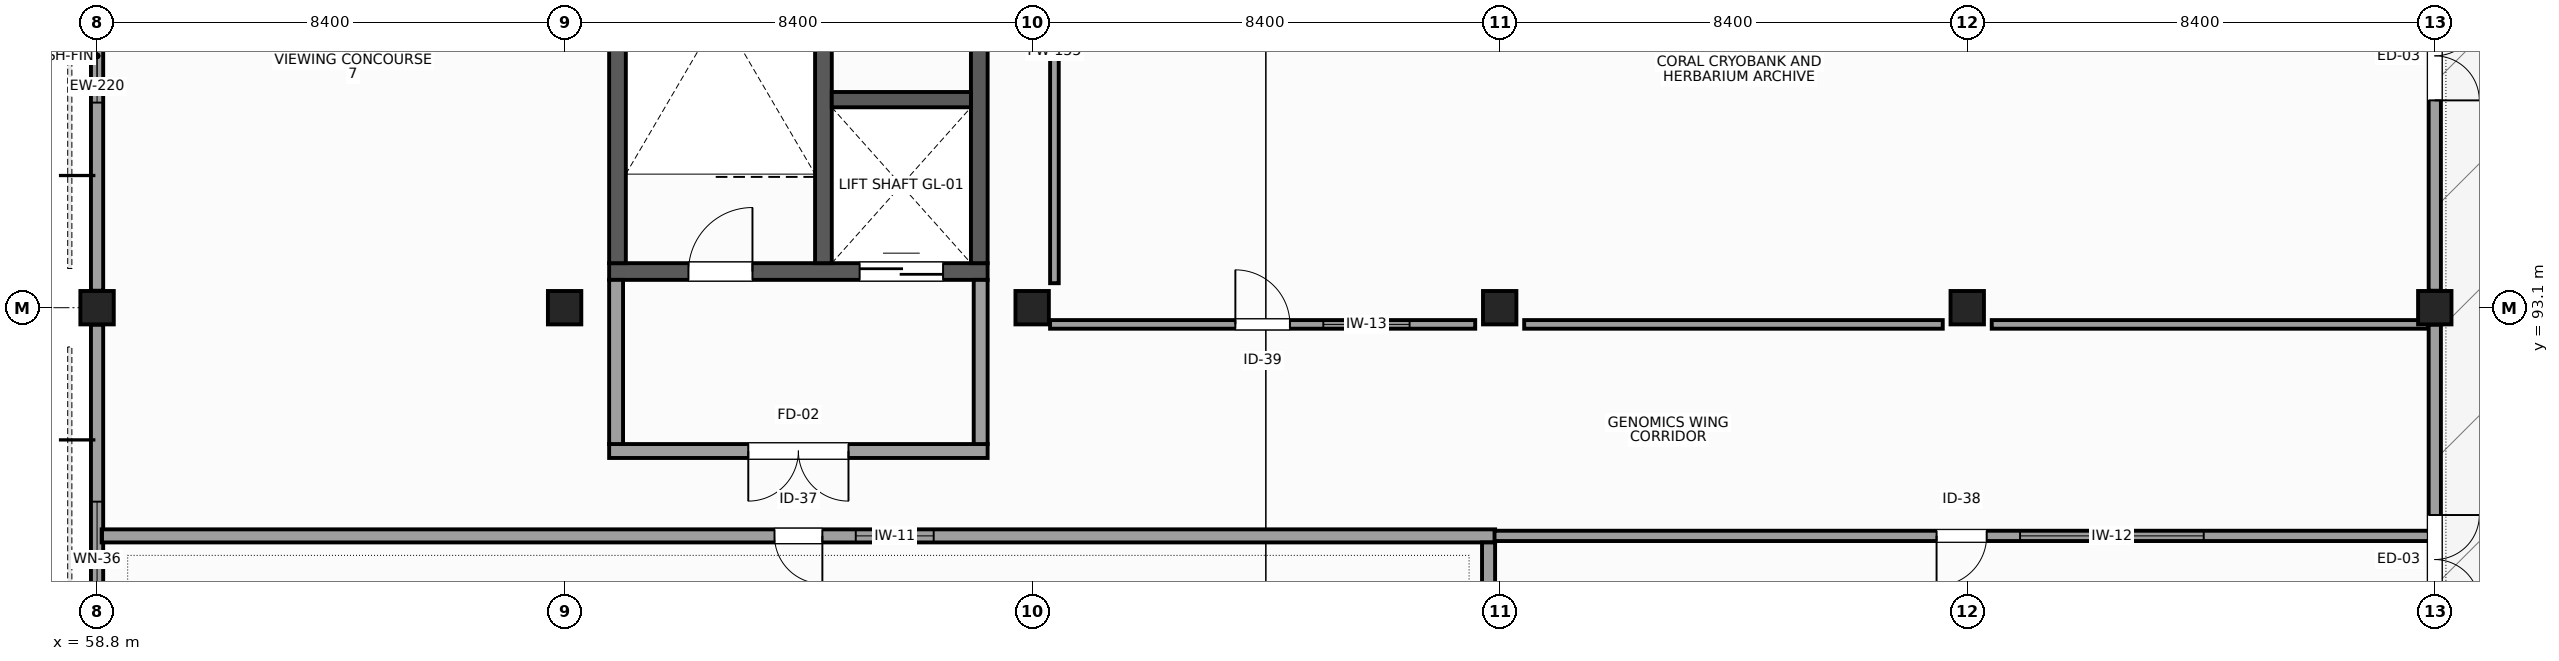
"""IFC4 building model, lengths in metres.
Left out: names, types, materials, properties, quantities, classifications, styles, units other than length and angle.
Written with IfcOpenShell. Run it as: python <this file> out.ifc"""

import sys

from ifc_helpers import new_model, si_unit, direction, frame, frame_2d, origin, origin_2d, place, context, subcontext, project, spatial, rectangle, extrude, element, fill, save


model = new_model("IFC4")
c1 = context("Model", 3, precision=1e-05, world=origin(), true_north=direction((0.0, 1.0)))
c2 = subcontext(c1, "Body", "Model", "MODEL_VIEW")
j1 = project(units=[si_unit("LENGTHUNIT", "METRE"), si_unit("PLANEANGLEUNIT", "RADIAN")], contexts=[c1])
p1 = place(None, origin())
s1 = spatial("IfcSite", under=j1, at=p1, CompositionType="ELEMENT")
p2 = place(p1, origin())
s2 = spatial("IfcBuilding", under=s1, at=p2, CompositionType="ELEMENT")
p3 = place(p2, frame((0.0, 0.0, 20.1)))
s3 = spatial("IfcBuildingStorey", under=s2, at=p3, CompositionType="ELEMENT", Elevation=20.1)
for number, where, z_axis, x_axis in (
    (1, (58.8, 93.1, 0.0), (0.0, 0.0, 1.0), (1.0, 0.0, 0.0)),
    (2, (67.2, 93.1, 0.0), (0.0, 0.0, 1.0), (1.0, 0.0, 0.0)),
    (3, (75.6, 93.1, 0.0), (0.0, 0.0, 1.0), (1.0, 0.0, 0.0)),
    (4, (84.0, 93.1, 0.0), (0.0, 0.0, 1.0), (1.0, 0.0, 0.0)),
    (5, (92.4, 93.1, 0.0), (0.0, 0.0, 1.0), (1.0, 0.0, 0.0)),
    (6, (100.8, 93.1, 0.0), (0.0, 0.0, 1.0), (1.0, 0.0, 0.0)),
):
    element("IfcColumn", number, at=place(p3, frame(where, z_axis=z_axis, x_axis=x_axis)), inside=s3, PredefinedType="COLUMN", context=c2, shape_type="SweptSolid", body=[
        extrude(rectangle(XDim=0.6, YDim=0.6, at=origin_2d()), origin(), (0.0, 0.0, 1.0), 4.5),
    ])
p4 = place(p3, frame((100.8, 84.355, 0.0), z_axis=(0.0, 0.0, 1.0), x_axis=(0.0, 1.0, 0.0)))
e7 = element("IfcWall", 7, at=p4, inside=s3, PredefinedType="STANDARD", context=c2, shape_type="SweptSolid", body=[
    extrude(rectangle(XDim=8.44, YDim=0.22, at=frame_2d((4.22, 0.0))), origin(), (0.0, 0.0, 1.0), 3.631),
])
p5 = place(p4, frame((3.42, 0.0, 0.0)))
e8 = element("IfcOpeningElement", 8, at=p5, cuts=e7, PredefinedType="OPENING", context=c2, shape_type="SweptSolid", body=[
    extrude(rectangle(XDim=1.6, YDim=2.25, at=frame_2d((0.8, 1.125))), frame((0.0, 0.12, 0.0), z_axis=(0.0, -1.0, 0.0), x_axis=(1.0, 0.0, 0.0)), (0.0, 0.0, 1.0), 0.24),
])
p6 = place(p3, frame((100.8, 93.405, 0.0), z_axis=(0.0, 0.0, 1.0), x_axis=(0.0, 1.0, 0.0)))
e9 = element("IfcWall", 9, at=p6, inside=s3, PredefinedType="STANDARD", context=c2, shape_type="SweptSolid", body=[
    extrude(rectangle(XDim=8.44, YDim=0.22, at=frame_2d((4.22, 0.0))), origin(), (0.0, 0.0, 1.0), 3.631),
])
p7 = place(p6, frame((3.42, 0.0, 0.0)))
e10 = element("IfcOpeningElement", 10, at=p7, cuts=e9, PredefinedType="OPENING", context=c2, shape_type="SweptSolid", body=[
    extrude(rectangle(XDim=1.6, YDim=2.25, at=frame_2d((0.8, 1.125))), frame((0.0, 0.12, 0.0), z_axis=(0.0, -1.0, 0.0), x_axis=(1.0, 0.0, 0.0)), (0.0, 0.0, 1.0), 0.24),
])
p8 = place(p3, frame((58.8, 101.845, 0.0), z_axis=(0.0, 0.0, 1.0), x_axis=(0.0, -1.0, 0.0)))
e11 = element("IfcWall", 11, at=p8, inside=s3, PredefinedType="STANDARD", context=c2, shape_type="SweptSolid", body=[
    extrude(rectangle(XDim=8.44, YDim=0.22, at=frame_2d((4.22, 0.0))), origin(), (0.0, 0.0, 1.0), 3.631),
])
p9 = place(p8, frame((3.38, 0.0, 0.95)))
e12 = element("IfcOpeningElement", 12, at=p9, cuts=e11, PredefinedType="OPENING", context=c2, shape_type="SweptSolid", body=[
    extrude(rectangle(XDim=1.68, YDim=2.08, at=frame_2d((0.84, 1.04))), frame((0.0, 0.12, 0.0), z_axis=(0.0, -1.0, 0.0), x_axis=(1.0, 0.0, 0.0)), (0.0, 0.0, 1.0), 0.24),
])
p10 = place(p3, frame((58.8, 92.795, 0.0), z_axis=(0.0, 0.0, 1.0), x_axis=(0.0, -1.0, 0.0)))
e13 = element("IfcWall", 13, at=p10, inside=s3, PredefinedType="STANDARD", context=c2, shape_type="SweptSolid", body=[
    extrude(rectangle(XDim=8.44, YDim=0.22, at=frame_2d((4.22, 0.0))), origin(), (0.0, 0.0, 1.0), 3.631),
])
p11 = place(p10, frame((3.18, 0.0, 0.95)))
e14 = element("IfcOpeningElement", 14, at=p11, cuts=e13, PredefinedType="OPENING", context=c2, shape_type="SweptSolid", body=[
    extrude(rectangle(XDim=2.08, YDim=2.28, at=frame_2d((1.04, 1.14))), frame((0.0, 0.12, 0.0), z_axis=(0.0, -1.0, 0.0), x_axis=(1.0, 0.0, 0.0)), (0.0, 0.0, 1.0), 0.24),
])
p12 = place(p3, frame((68.0, 93.75, 0.0), z_axis=(0.0, 0.0, 1.0), x_axis=(1.0, 0.0, 0.0)))
e15 = element("IfcWall", 15, at=p12, inside=s3, PredefinedType="SHEAR", context=c2, shape_type="SweptSolid", body=[
    extrude(rectangle(XDim=6.8, YDim=0.3, at=frame_2d((3.4, 0.0))), origin(), (0.0, 0.0, 1.0), 4.2),
])
p13 = place(p12, frame((1.425, 0.0, 0.0)))
e16 = element("IfcOpeningElement", 16, at=p13, cuts=e15, PredefinedType="OPENING", context=c2, shape_type="SweptSolid", body=[
    extrude(rectangle(XDim=1.15, YDim=2.2, at=frame_2d((0.575, 1.1))), frame((0.0, 0.16, 0.0), z_axis=(0.0, -1.0, 0.0), x_axis=(1.0, 0.0, 0.0)), (0.0, 0.0, 1.0), 0.32),
])
p14 = place(p12, frame((4.5, 0.0, 0.0)))
e17 = element("IfcOpeningElement", 17, at=p14, cuts=e15, PredefinedType="OPENING", context=c2, shape_type="SweptSolid", body=[
    extrude(rectangle(XDim=1.5, YDim=2.3, at=frame_2d((0.75, 1.15))), frame((0.0, 0.16, 0.0), z_axis=(0.0, -1.0, 0.0), x_axis=(1.0, 0.0, 0.0)), (0.0, 0.0, 1.0), 0.32),
])
for number, where, z_axis, x_axis in (
    (18, (68.15, 93.9, 0.0), (0.0, 0.0, 1.0), (0.0, 1.0, 0.0)),
    (19, (74.65, 93.9, 0.0), (0.0, 0.0, 1.0), (0.0, 1.0, 0.0)),
    (20, (71.85, 93.9, 0.0), (0.0, 0.0, 1.0), (0.0, 1.0, 0.0)),
):
    element("IfcWall", number, at=place(p3, frame(where, z_axis=z_axis, x_axis=x_axis)), inside=s3, PredefinedType="SHEAR", context=c2, shape_type="SweptSolid", body=[
        extrude(rectangle(XDim=7.4, YDim=0.3, at=frame_2d((3.7, 0.0))), origin(), (0.0, 0.0, 1.0), 4.2),
    ])
p15 = place(p3, frame((72.0, 96.838, 0.0), z_axis=(0.0, 0.0, 1.0), x_axis=(1.0, 0.0, 0.0)))
e21 = element("IfcWall", 21, at=p15, inside=s3, PredefinedType="SHEAR", context=c2, shape_type="SweptSolid", body=[
    extrude(rectangle(XDim=2.5, YDim=0.275, at=frame_2d((1.25, 0.0))), origin(), (0.0, 0.0, 1.0), 4.2),
])
p16 = place(p3, frame((68.0, 90.525, 0.0), z_axis=(0.0, 0.0, 1.0), x_axis=(1.0, 0.0, 0.0)))
e22 = element("IfcWall", 22, at=p16, inside=s3, PredefinedType="PARTITIONING", context=c2, shape_type="SweptSolid", body=[
    extrude(rectangle(XDim=6.8, YDim=0.25, at=frame_2d((3.4, 0.0))), origin(), (0.0, 0.0, 1.0), 4.2),
])
p17 = place(p16, frame((2.5, 0.0, 0.0)))
e23 = element("IfcOpeningElement", 23, at=p17, cuts=e22, PredefinedType="OPENING", context=c2, shape_type="SweptSolid", body=[
    extrude(rectangle(XDim=1.8, YDim=2.25, at=frame_2d((0.9, 1.125))), frame((0.0, 0.135, 0.0), z_axis=(0.0, -1.0, 0.0), x_axis=(1.0, 0.0, 0.0)), (0.0, 0.0, 1.0), 0.27),
])
for number, where, z_axis, x_axis in (
    (24, (68.125, 90.65, 0.0), (0.0, 0.0, 1.0), (0.0, 1.0, 0.0)),
    (25, (74.675, 90.65, 0.0), (0.0, 0.0, 1.0), (0.0, 1.0, 0.0)),
):
    element("IfcWall", number, at=place(p3, frame(where, z_axis=z_axis, x_axis=x_axis)), inside=s3, PredefinedType="PARTITIONING", context=c2, shape_type="SweptSolid", body=[
        extrude(rectangle(XDim=2.95, YDim=0.25, at=frame_2d((1.475, 0.0))), origin(), (0.0, 0.0, 1.0), 3.631),
    ])
p18 = place(p3, frame((58.883, 89.0, 0.0), z_axis=(0.0, 0.0, 1.0), x_axis=(1.0, 0.0, 0.0)))
e26 = element("IfcWall", 26, at=p18, inside=s3, PredefinedType="PARTITIONING", context=c2, shape_type="SweptSolid", body=[
    extrude(rectangle(XDim=25.035, YDim=0.235, at=frame_2d((12.518, 0.0))), origin(), (0.0, 0.0, 1.0), 3.631),
])
p19 = place(p18, frame((12.088, 0.0, 0.0)))
e27 = element("IfcOpeningElement", 27, at=p19, cuts=e26, PredefinedType="OPENING", context=c2, shape_type="SweptSolid", body=[
    extrude(rectangle(XDim=0.86, YDim=2.1, at=frame_2d((0.43, 1.05))), frame((0.0, 0.127, 0.0), z_axis=(0.0, -1.0, 0.0), x_axis=(1.0, 0.0, 0.0)), (0.0, 0.0, 1.0), 0.255),
])
p20 = place(p18, frame((13.548, 0.0, 1.05)))
e28 = element("IfcOpeningElement", 28, at=p20, cuts=e26, PredefinedType="OPENING", context=c2, shape_type="SweptSolid", body=[
    extrude(rectangle(XDim=1.4, YDim=1.1, at=frame_2d((0.7, 0.55))), frame((0.0, 0.127, 0.0), z_axis=(0.0, -1.0, 0.0), x_axis=(1.0, 0.0, 0.0)), (0.0, 0.0, 1.0), 0.255),
])
p21 = place(p3, frame((83.8, 84.368, 0.0), z_axis=(0.0, 0.0, 1.0), x_axis=(0.0, 1.0, 0.0)))
e29 = element("IfcWall", 29, at=p21, inside=s3, PredefinedType="PARTITIONING", context=c2, shape_type="SweptSolid", body=[
    extrude(rectangle(XDim=4.514, YDim=0.235, at=frame_2d((2.257, 0.0))), origin(), (0.0, 0.0, 1.0), 3.631),
])
p22 = place(p3, frame((83.907, 89.0, 0.0), z_axis=(0.0, 0.0, 1.0), x_axis=(1.0, 0.0, 0.0)))
e30 = element("IfcWall", 30, at=p22, inside=s3, PredefinedType="PARTITIONING", context=c2, shape_type="SweptSolid", body=[
    extrude(rectangle(XDim=16.785, YDim=0.185, at=frame_2d((8.393, 0.0))), origin(), (0.0, 0.0, 1.0), 3.631),
])
p23 = place(p22, frame((7.942, 0.0, 0.0)))
e31 = element("IfcOpeningElement", 31, at=p23, cuts=e30, PredefinedType="OPENING", context=c2, shape_type="SweptSolid", body=[
    extrude(rectangle(XDim=0.9, YDim=2.16, at=frame_2d((0.45, 1.08))), frame((0.0, 0.103, 0.0), z_axis=(0.0, -1.0, 0.0), x_axis=(1.0, 0.0, 0.0)), (0.0, 0.0, 1.0), 0.205),
])
p24 = place(p22, frame((9.442, 0.0, 1.05)))
e32 = element("IfcOpeningElement", 32, at=p24, cuts=e30, PredefinedType="OPENING", context=c2, shape_type="SweptSolid", body=[
    extrude(rectangle(XDim=3.3, YDim=1.35, at=frame_2d((1.65, 0.675))), frame((0.0, 0.103, 0.0), z_axis=(0.0, -1.0, 0.0), x_axis=(1.0, 0.0, 0.0)), (0.0, 0.0, 1.0), 0.205),
])
p25 = place(p3, frame((75.922, 92.8, 0.0), z_axis=(0.0, 0.0, 1.0), x_axis=(1.0, 0.0, 0.0)))
e33 = element("IfcWall", 33, at=p25, inside=s3, PredefinedType="PARTITIONING", context=c2, shape_type="SweptSolid", body=[
    extrude(rectangle(XDim=7.638, YDim=0.155, at=frame_2d((3.819, 0.0))), origin(), (0.0, 0.0, 1.0), 4.2),
])
p26 = place(p25, frame((3.329, 0.0, 0.0)))
e34 = element("IfcOpeningElement", 34, at=p26, cuts=e33, PredefinedType="OPENING", context=c2, shape_type="SweptSolid", body=[
    extrude(rectangle(XDim=0.98, YDim=2.22, at=frame_2d((0.49, 1.11))), frame((0.0, 0.087, 0.0), z_axis=(0.0, -1.0, 0.0), x_axis=(1.0, 0.0, 0.0)), (0.0, 0.0, 1.0), 0.175),
])
p27 = place(p25, frame((4.909, 0.0, 1.05)))
e35 = element("IfcOpeningElement", 35, at=p27, cuts=e33, PredefinedType="OPENING", context=c2, shape_type="SweptSolid", body=[
    extrude(rectangle(XDim=1.55, YDim=1.32, at=frame_2d((0.775, 0.66))), frame((0.0, 0.087, 0.0), z_axis=(0.0, -1.0, 0.0), x_axis=(1.0, 0.0, 0.0)), (0.0, 0.0, 1.0), 0.175),
])
p28 = place(p3, frame((84.44, 92.8, 0.0), z_axis=(0.0, 0.0, 1.0), x_axis=(1.0, 0.0, 0.0)))
e36 = element("IfcWall", 36, at=p28, inside=s3, PredefinedType="PARTITIONING", context=c2, shape_type="SweptSolid", body=[
    extrude(rectangle(XDim=7.52, YDim=0.155, at=frame_2d((3.76, 0.0))), origin(), (0.0, 0.0, 1.0), 4.2),
])
p29 = place(p3, frame((92.84, 92.8, 0.0), z_axis=(0.0, 0.0, 1.0), x_axis=(1.0, 0.0, 0.0)))
e37 = element("IfcWall", 37, at=p29, inside=s3, PredefinedType="PARTITIONING", context=c2, shape_type="SweptSolid", body=[
    extrude(rectangle(XDim=7.837, YDim=0.155, at=frame_2d((3.918, 0.0))), origin(), (0.0, 0.0, 1.0), 3.631),
])
p30 = place(p3, frame((76.0, 93.54, 0.0), z_axis=(0.0, 0.0, 1.0), x_axis=(0.0, 1.0, 0.0)))
e38 = element("IfcWall", 38, at=p30, inside=s3, PredefinedType="PARTITIONING", context=c2, shape_type="SweptSolid", body=[
    extrude(rectangle(XDim=8.333, YDim=0.155, at=frame_2d((4.167, 0.0))), origin(), (0.0, 0.0, 1.0), 3.763),
])
p31 = place(p5, frame((1.6, 0.0, 0.0), z_axis=(0.0, 0.0, 1.0), x_axis=(-1.0, 0.0, 0.0)))
e39 = element("IfcDoor", 39, at=p31, inside=s3, OperationType="DOUBLE_DOOR_SINGLE_SWING", PredefinedType="DOOR", context=c2, shape_type="SweptSolid", body=[
    extrude(rectangle(XDim=1.6, YDim=2.25, at=frame_2d((0.8, 1.125))), frame((0.0, 0.025, 0.0), z_axis=(0.0, -1.0, 0.0), x_axis=(1.0, 0.0, 0.0)), (0.0, 0.0, 1.0), 0.05),
])
fill(e8, e39)
p32 = place(p7, frame((1.6, 0.0, 0.0), z_axis=(0.0, 0.0, 1.0), x_axis=(-1.0, 0.0, 0.0)))
e40 = element("IfcDoor", 40, at=p32, inside=s3, OperationType="DOUBLE_DOOR_SINGLE_SWING", PredefinedType="DOOR", context=c2, shape_type="SweptSolid", body=[
    extrude(rectangle(XDim=1.6, YDim=2.25, at=frame_2d((0.8, 1.125))), frame((0.0, 0.025, 0.0), z_axis=(0.0, -1.0, 0.0), x_axis=(1.0, 0.0, 0.0)), (0.0, 0.0, 1.0), 0.05),
])
fill(e10, e40)
p33 = place(p9, origin())
e41 = element("IfcWindow", 41, at=p33, inside=s3, PartitioningType="SINGLE_PANEL", PredefinedType="WINDOW", context=c2, shape_type="SweptSolid", body=[
    extrude(rectangle(XDim=1.68, YDim=2.08, at=frame_2d((0.84, 1.04))), frame((0.0, 0.03, 0.0), z_axis=(0.0, -1.0, 0.0), x_axis=(1.0, 0.0, 0.0)), (0.0, 0.0, 1.0), 0.06),
])
fill(e12, e41)
p34 = place(p11, origin())
e42 = element("IfcWindow", 42, at=p34, inside=s3, PartitioningType="SINGLE_PANEL", PredefinedType="WINDOW", context=c2, shape_type="SweptSolid", body=[
    extrude(rectangle(XDim=2.08, YDim=2.28, at=frame_2d((1.04, 1.14))), frame((0.0, 0.03, 0.0), z_axis=(0.0, -1.0, 0.0), x_axis=(1.0, 0.0, 0.0)), (0.0, 0.0, 1.0), 0.06),
])
fill(e14, e42)
p35 = place(p13, origin())
e43 = element("IfcDoor", 43, at=p35, inside=s3, OperationType="SINGLE_SWING_RIGHT", PredefinedType="DOOR", context=c2, shape_type="SweptSolid", body=[
    extrude(rectangle(XDim=1.15, YDim=2.2, at=frame_2d((0.575, 1.1))), frame((0.0, 0.025, 0.0), z_axis=(0.0, -1.0, 0.0), x_axis=(1.0, 0.0, 0.0)), (0.0, 0.0, 1.0), 0.05),
])
fill(e16, e43)
p36 = place(p14, origin())
e44 = element("IfcDoor", 44, at=p36, inside=s3, OperationType="DOUBLE_DOOR_SLIDING", PredefinedType="DOOR", context=c2, shape_type="SweptSolid", body=[
    extrude(rectangle(XDim=1.5, YDim=2.3, at=frame_2d((0.75, 1.15))), frame((0.0, 0.025, 0.0), z_axis=(0.0, -1.0, 0.0), x_axis=(1.0, 0.0, 0.0)), (0.0, 0.0, 1.0), 0.05),
])
fill(e17, e44)
p37 = place(p17, frame((1.8, 0.0, 0.0), z_axis=(0.0, 0.0, 1.0), x_axis=(-1.0, 0.0, 0.0)))
e45 = element("IfcDoor", 45, at=p37, inside=s3, OperationType="DOUBLE_DOOR_SINGLE_SWING", PredefinedType="DOOR", context=c2, shape_type="SweptSolid", body=[
    extrude(rectangle(XDim=1.8, YDim=2.25, at=frame_2d((0.9, 1.125))), frame((0.0, 0.025, 0.0), z_axis=(0.0, -1.0, 0.0), x_axis=(1.0, 0.0, 0.0)), (0.0, 0.0, 1.0), 0.05),
])
fill(e23, e45)
p38 = place(p19, frame((0.86, 0.0, 0.0), z_axis=(0.0, 0.0, 1.0), x_axis=(-1.0, 0.0, 0.0)))
e46 = element("IfcDoor", 46, at=p38, inside=s3, OperationType="SINGLE_SWING_LEFT", PredefinedType="DOOR", context=c2, shape_type="SweptSolid", body=[
    extrude(rectangle(XDim=0.86, YDim=2.1, at=frame_2d((0.43, 1.05))), frame((0.0, 0.025, 0.0), z_axis=(0.0, -1.0, 0.0), x_axis=(1.0, 0.0, 0.0)), (0.0, 0.0, 1.0), 0.05),
])
fill(e27, e46)
p39 = place(p20, origin())
e47 = element("IfcWindow", 47, at=p39, inside=s3, PartitioningType="SINGLE_PANEL", PredefinedType="WINDOW", context=c2, shape_type="SweptSolid", body=[
    extrude(rectangle(XDim=1.4, YDim=1.1, at=frame_2d((0.7, 0.55))), frame((0.0, 0.03, 0.0), z_axis=(0.0, -1.0, 0.0), x_axis=(1.0, 0.0, 0.0)), (0.0, 0.0, 1.0), 0.06),
])
fill(e28, e47)
p40 = place(p23, frame((0.9, 0.0, 0.0), z_axis=(0.0, 0.0, 1.0), x_axis=(-1.0, 0.0, 0.0)))
e48 = element("IfcDoor", 48, at=p40, inside=s3, OperationType="SINGLE_SWING_RIGHT", PredefinedType="DOOR", context=c2, shape_type="SweptSolid", body=[
    extrude(rectangle(XDim=0.9, YDim=2.16, at=frame_2d((0.45, 1.08))), frame((0.0, 0.025, 0.0), z_axis=(0.0, -1.0, 0.0), x_axis=(1.0, 0.0, 0.0)), (0.0, 0.0, 1.0), 0.05),
])
fill(e31, e48)
p41 = place(p24, origin())
e49 = element("IfcWindow", 49, at=p41, inside=s3, PartitioningType="SINGLE_PANEL", PredefinedType="WINDOW", context=c2, shape_type="SweptSolid", body=[
    extrude(rectangle(XDim=3.3, YDim=1.35, at=frame_2d((1.65, 0.675))), frame((0.0, 0.03, 0.0), z_axis=(0.0, -1.0, 0.0), x_axis=(1.0, 0.0, 0.0)), (0.0, 0.0, 1.0), 0.06),
])
fill(e32, e49)
p42 = place(p26, origin())
e50 = element("IfcDoor", 50, at=p42, inside=s3, OperationType="SINGLE_SWING_LEFT", PredefinedType="DOOR", context=c2, shape_type="SweptSolid", body=[
    extrude(rectangle(XDim=0.98, YDim=2.22, at=frame_2d((0.49, 1.11))), frame((0.0, 0.025, 0.0), z_axis=(0.0, -1.0, 0.0), x_axis=(1.0, 0.0, 0.0)), (0.0, 0.0, 1.0), 0.05),
])
fill(e34, e50)
p43 = place(p27, origin())
e51 = element("IfcWindow", 51, at=p43, inside=s3, PartitioningType="SINGLE_PANEL", PredefinedType="WINDOW", context=c2, shape_type="SweptSolid", body=[
    extrude(rectangle(XDim=1.55, YDim=1.32, at=frame_2d((0.775, 0.66))), frame((0.0, 0.03, 0.0), z_axis=(0.0, -1.0, 0.0), x_axis=(1.0, 0.0, 0.0)), (0.0, 0.0, 1.0), 0.06),
])
fill(e35, e51)
save(model, sys.argv[1])
